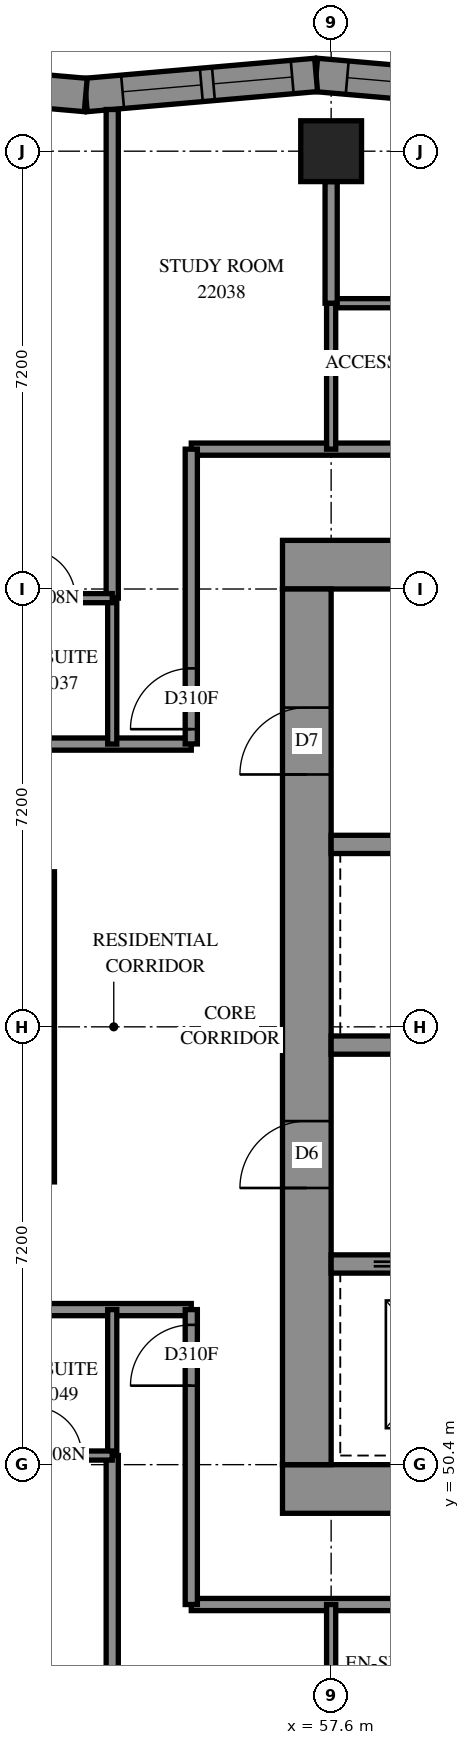
"""IFC4 building model, lengths in metres.
Left out: names, types, materials, properties, quantities, classifications, styles, units other than length and angle.
Written with IfcOpenShell. Run it as: python <this file> out.ifc"""

import sys

from ifc_helpers import new_model, si_unit, direction, frame, frame_2d, origin, origin_2d, place, context, subcontext, project, spatial, polyline, rectangle, outline, extrude, element, fill, save


model = new_model("IFC4")
c1 = context("Model", 3, precision=1e-05, world=origin(), true_north=direction((0.0, 1.0)))
c2 = subcontext(c1, "Body", "Model", "MODEL_VIEW")
j1 = project(units=[si_unit("LENGTHUNIT", "METRE"), si_unit("PLANEANGLEUNIT", "RADIAN")], contexts=[c1])
p1 = place(None, origin())
s1 = spatial("IfcSite", under=j1, at=p1, CompositionType="ELEMENT")
p2 = place(p1, origin())
s2 = spatial("IfcBuilding", under=s1, at=p2, CompositionType="ELEMENT")
p3 = place(p2, frame((0.0, 0.0, 84.6)))
s3 = spatial("IfcBuildingStorey", under=s2, at=p3, CompositionType="ELEMENT", Elevation=84.6)
p4 = place(p3, frame((57.6, 72.0, 0.0), z_axis=(0.0, 0.0, 1.0), x_axis=(1.0, 0.0, 0.0)))
e1 = element("IfcColumn", 1, at=p4, inside=s3, PredefinedType="COLUMN", context=c2, shape_type="SweptSolid", body=[
    extrude(rectangle(XDim=1.0, YDim=1.0, at=origin_2d()), origin(), (0.0, 0.0, 1.0), 3.1),
])
p5 = place(p3, frame((56.8, 50.0, -0.3), z_axis=(0.0, 0.0, 1.0), x_axis=(1.0, 0.0, 0.0)))
e2 = element("IfcWall", 2, at=p5, inside=s3, PredefinedType="SHEAR", context=c2, shape_type="SweptSolid", body=[
    extrude(rectangle(XDim=16.0, YDim=0.8, at=frame_2d((8.0, 0.0))), origin(), (0.0, 0.0, 1.0), 2.7),
])
p6 = place(p3, frame((56.8, 65.2, -0.3), z_axis=(0.0, 0.0, 1.0), x_axis=(1.0, 0.0, 0.0)))
e3 = element("IfcWall", 3, at=p6, inside=s3, PredefinedType="SHEAR", context=c2, shape_type="SweptSolid", body=[
    extrude(rectangle(XDim=16.0, YDim=0.8, at=frame_2d((8.0, 0.0))), origin(), (0.0, 0.0, 1.0), 2.7),
])
p7 = place(p6, frame((10.8, 0.0, 0.3)))
e4 = element("IfcOpeningElement", 4, at=p7, cuts=e3, PredefinedType="OPENING", context=c2, shape_type="SweptSolid", body=[
    extrude(rectangle(XDim=0.8, YDim=2.1, at=frame_2d((0.4, 1.05))), frame((0.0, 0.41, 0.0), z_axis=(0.0, -1.0, 0.0), x_axis=(1.0, 0.0, 0.0)), (0.0, 0.0, 1.0), 0.82),
])
p8 = place(p3, frame((57.2, 50.4, -0.3), z_axis=(0.0, 0.0, 1.0), x_axis=(0.0, 1.0, 0.0)))
e5 = element("IfcWall", 5, at=p8, inside=s3, PredefinedType="SHEAR", context=c2, shape_type="SweptSolid", body=[
    extrude(rectangle(XDim=14.4, YDim=0.8, at=frame_2d((7.2, 0.0))), origin(), (0.0, 0.0, 1.0), 2.7),
])
p9 = place(p8, frame((4.55, 0.0, 0.3)))
e6 = element("IfcOpeningElement", 6, at=p9, cuts=e5, PredefinedType="OPENING", context=c2, shape_type="SweptSolid", body=[
    extrude(rectangle(XDim=1.1, YDim=2.1, at=frame_2d((0.55, 1.05))), frame((0.0, 0.41, 0.0), z_axis=(0.0, -1.0, 0.0), x_axis=(1.0, 0.0, 0.0)), (0.0, 0.0, 1.0), 0.82),
])
p10 = place(p8, frame((11.35, 0.0, 0.3)))
e7 = element("IfcOpeningElement", 7, at=p10, cuts=e5, PredefinedType="OPENING", context=c2, shape_type="SweptSolid", body=[
    extrude(rectangle(XDim=1.1, YDim=2.1, at=frame_2d((0.55, 1.05))), frame((0.0, 0.41, 0.0), z_axis=(0.0, -1.0, 0.0), x_axis=(1.0, 0.0, 0.0)), (0.0, 0.0, 1.0), 0.82),
])
p11 = place(p3, frame((57.6, 53.7, 0.0), z_axis=(0.0, 0.0, 1.0), x_axis=(1.0, 0.0, 0.0)))
e8 = element("IfcWall", 8, at=p11, inside=s3, PredefinedType="SOLIDWALL", context=c2, shape_type="SweptSolid", body=[
    extrude(rectangle(XDim=14.4, YDim=0.3, at=frame_2d((7.2, 0.0))), origin(), (0.0, 0.0, 1.0), 3.1),
])
p12 = place(p11, frame((1.25, 0.0, 0.0)))
e9 = element("IfcOpeningElement", 9, at=p12, cuts=e8, PredefinedType="OPENING", context=c2, shape_type="SweptSolid", body=[
    extrude(rectangle(XDim=1.1, YDim=2.1, at=frame_2d((0.55, 1.05))), frame((0.0, 0.16, 0.0), z_axis=(0.0, -1.0, 0.0), x_axis=(1.0, 0.0, 0.0)), (0.0, 0.0, 1.0), 0.32),
])
p13 = place(p11, frame((4.85, 0.0, 0.0)))
e10 = element("IfcOpeningElement", 10, at=p13, cuts=e8, PredefinedType="OPENING", context=c2, shape_type="SweptSolid", body=[
    extrude(rectangle(XDim=1.1, YDim=2.1, at=frame_2d((0.55, 1.05))), frame((0.0, 0.16, 0.0), z_axis=(0.0, -1.0, 0.0), x_axis=(1.0, 0.0, 0.0)), (0.0, 0.0, 1.0), 0.32),
])
p14 = place(p11, frame((8.45, 0.0, 0.0)))
e11 = element("IfcOpeningElement", 11, at=p14, cuts=e8, PredefinedType="OPENING", context=c2, shape_type="SweptSolid", body=[
    extrude(rectangle(XDim=1.1, YDim=2.1, at=frame_2d((0.55, 1.05))), frame((0.0, 0.16, 0.0), z_axis=(0.0, -1.0, 0.0), x_axis=(1.0, 0.0, 0.0)), (0.0, 0.0, 1.0), 0.32),
])
p15 = place(p11, frame((12.05, 0.0, 0.0)))
e12 = element("IfcOpeningElement", 12, at=p15, cuts=e8, PredefinedType="OPENING", context=c2, shape_type="SweptSolid", body=[
    extrude(rectangle(XDim=1.1, YDim=2.1, at=frame_2d((0.55, 1.05))), frame((0.0, 0.16, 0.0), z_axis=(0.0, -1.0, 0.0), x_axis=(1.0, 0.0, 0.0)), (0.0, 0.0, 1.0), 0.32),
])
p16 = place(p3, frame((57.6, 57.3, 0.0), z_axis=(0.0, 0.0, 1.0), x_axis=(1.0, 0.0, 0.0)))
e13 = element("IfcWall", 13, at=p16, inside=s3, PredefinedType="SOLIDWALL", context=c2, shape_type="SweptSolid", body=[
    extrude(rectangle(XDim=14.4, YDim=0.3, at=frame_2d((7.2, 0.0))), origin(), (0.0, 0.0, 1.0), 3.1),
])
p17 = place(p16, frame((12.05, 0.0, 0.0)))
e14 = element("IfcOpeningElement", 14, at=p17, cuts=e13, PredefinedType="OPENING", context=c2, shape_type="SweptSolid", body=[
    extrude(rectangle(XDim=1.1, YDim=2.1, at=frame_2d((0.55, 1.05))), frame((0.0, 0.16, 0.0), z_axis=(0.0, -1.0, 0.0), x_axis=(1.0, 0.0, 0.0)), (0.0, 0.0, 1.0), 0.32),
])
p18 = place(p3, frame((57.6, 60.6, 0.0), z_axis=(0.0, 0.0, 1.0), x_axis=(1.0, 0.0, 0.0)))
e15 = element("IfcWall", 15, at=p18, inside=s3, PredefinedType="SOLIDWALL", context=c2, shape_type="SweptSolid", body=[
    extrude(rectangle(XDim=7.2, YDim=0.3, at=frame_2d((3.6, 0.0))), origin(), (0.0, 0.0, 1.0), 3.1),
])
p19 = place(p3, frame((61.141, 72.924, 0.0), z_axis=(0.0, 0.0, 1.0), x_axis=(-0.9962273538, 0.0867816769, 0.0)))
e16 = element("IfcWall", 16, at=p19, inside=s3, PredefinedType="SOLIDWALL", context=c2, shape_type="SweptSolid", body=[
    extrude(outline(polyline([(0.024, -0.275), (3.827, -0.275), (3.779, 0.275), (-0.024, 0.275), (0.024, -0.275)])), origin(), (0.0, 0.0, 1.0), 3.1),
])
p20 = place(p19, frame((0.489, 0.0, 0.5)))
e17 = element("IfcOpeningElement", 17, at=p20, cuts=e16, PredefinedType="OPENING", context=c2, shape_type="SweptSolid", body=[
    extrude(rectangle(XDim=1.3, YDim=2.45, at=frame_2d((0.65, 1.225))), frame((0.0, 0.285, 0.0), z_axis=(0.0, -1.0, 0.0), x_axis=(1.0, 0.0, 0.0)), (0.0, 0.0, 1.0), 0.57),
])
p21 = place(p19, frame((1.989, 0.0, 0.5)))
e18 = element("IfcOpeningElement", 18, at=p21, cuts=e16, PredefinedType="OPENING", context=c2, shape_type="SweptSolid", body=[
    extrude(rectangle(XDim=1.3, YDim=2.45, at=frame_2d((0.65, 1.225))), frame((0.0, 0.285, 0.0), z_axis=(0.0, -1.0, 0.0), x_axis=(1.0, 0.0, 0.0)), (0.0, 0.0, 1.0), 0.57),
])
p22 = place(p3, frame((57.353, 73.254, 0.0), z_axis=(0.0, 0.0, 1.0), x_axis=(-0.9962273538, -0.0867816769, 0.0)))
e19 = element("IfcWall", 19, at=p22, inside=s3, PredefinedType="SOLIDWALL", context=c2, shape_type="SweptSolid", body=[
    extrude(outline(polyline([(-0.024, -0.275), (3.779, -0.275), (3.827, 0.275), (0.024, 0.275), (-0.024, -0.275)])), origin(), (0.0, 0.0, 1.0), 3.1),
])
p23 = place(p22, frame((0.395, 0.0, 0.5)))
e20 = element("IfcOpeningElement", 20, at=p23, cuts=e19, PredefinedType="OPENING", context=c2, shape_type="SweptSolid", body=[
    extrude(rectangle(XDim=1.3, YDim=2.45, at=frame_2d((0.65, 1.225))), frame((0.0, 0.285, 0.0), z_axis=(0.0, -1.0, 0.0), x_axis=(1.0, 0.0, 0.0)), (0.0, 0.0, 1.0), 0.57),
])
p24 = place(p22, frame((1.895, 0.0, 0.5)))
e21 = element("IfcOpeningElement", 21, at=p24, cuts=e19, PredefinedType="OPENING", context=c2, shape_type="SweptSolid", body=[
    extrude(rectangle(XDim=1.3, YDim=2.45, at=frame_2d((0.65, 1.225))), frame((0.0, 0.285, 0.0), z_axis=(0.0, -1.0, 0.0), x_axis=(1.0, 0.0, 0.0)), (0.0, 0.0, 1.0), 0.57),
])
p25 = place(p3, frame((53.564, 72.924, 0.0), z_axis=(0.0, 0.0, 1.0), x_axis=(-0.9962271558, 0.0867839505, 0.0)))
e22 = element("IfcWall", 22, at=p25, inside=s3, PredefinedType="SOLIDWALL", context=c2, shape_type="SweptSolid", body=[
    extrude(outline(polyline([(0.024, -0.275), (3.827, -0.275), (3.779, 0.275), (-0.024, 0.275), (0.024, -0.275)])), origin(), (0.0, 0.0, 1.0), 3.1),
])
p26 = place(p25, frame((1.088, 0.0, 0.5)))
e23 = element("IfcOpeningElement", 23, at=p26, cuts=e22, PredefinedType="OPENING", context=c2, shape_type="SweptSolid", body=[
    extrude(rectangle(XDim=1.2, YDim=2.45, at=frame_2d((0.6, 1.225))), frame((0.0, 0.285, 0.0), z_axis=(0.0, -1.0, 0.0), x_axis=(1.0, 0.0, 0.0)), (0.0, 0.0, 1.0), 0.57),
])
p27 = place(p3, frame((33.45, 62.25, 0.0), z_axis=(0.0, 0.0, 1.0), x_axis=(1.0, 0.0, 0.0)))
e24 = element("IfcWall", 24, at=p27, inside=s3, PredefinedType="PARTITIONING", context=c2, shape_type="SweptSolid", body=[
    extrude(rectangle(XDim=21.85, YDim=0.2, at=frame_2d((10.925, 0.0))), origin(), (0.0, 0.0, 1.0), 3.1),
])
p28 = place(p27, frame((0.144, 0.0, 0.0)))
e25 = element("IfcOpeningElement", 25, at=p28, cuts=e24, PredefinedType="OPENING", context=c2, shape_type="SweptSolid", body=[
    extrude(rectangle(XDim=1.0, YDim=2.1, at=frame_2d((0.5, 1.05))), frame((0.0, 0.11, 0.0), z_axis=(0.0, -1.0, 0.0), x_axis=(1.0, 0.0, 0.0)), (0.0, 0.0, 1.0), 0.22),
])
p29 = place(p27, frame((2.95, 0.0, 0.0)))
e26 = element("IfcOpeningElement", 26, at=p29, cuts=e24, PredefinedType="OPENING", context=c2, shape_type="SweptSolid", body=[
    extrude(rectangle(XDim=0.9, YDim=2.1, at=frame_2d((0.45, 1.05))), frame((0.0, 0.11, 0.0), z_axis=(0.0, -1.0, 0.0), x_axis=(1.0, 0.0, 0.0)), (0.0, 0.0, 1.0), 0.22),
])
p30 = place(p27, frame((8.407, 0.0, 0.0)))
e27 = element("IfcOpeningElement", 27, at=p30, cuts=e24, PredefinedType="OPENING", context=c2, shape_type="SweptSolid", body=[
    extrude(rectangle(XDim=0.9, YDim=2.1, at=frame_2d((0.45, 1.05))), frame((0.0, 0.11, 0.0), z_axis=(0.0, -1.0, 0.0), x_axis=(1.0, 0.0, 0.0)), (0.0, 0.0, 1.0), 0.22),
])
p31 = place(p27, frame((15.7, 0.0, 0.0)))
e28 = element("IfcOpeningElement", 28, at=p31, cuts=e24, PredefinedType="OPENING", context=c2, shape_type="SweptSolid", body=[
    extrude(rectangle(XDim=0.9, YDim=2.1, at=frame_2d((0.45, 1.05))), frame((0.0, 0.11, 0.0), z_axis=(0.0, -1.0, 0.0), x_axis=(1.0, 0.0, 0.0)), (0.0, 0.0, 1.0), 0.22),
])
p32 = place(p27, frame((17.35, 0.0, 0.0)))
e29 = element("IfcOpeningElement", 29, at=p32, cuts=e24, PredefinedType="OPENING", context=c2, shape_type="SweptSolid", body=[
    extrude(rectangle(XDim=0.9, YDim=2.1, at=frame_2d((0.45, 1.05))), frame((0.0, 0.11, 0.0), z_axis=(0.0, -1.0, 0.0), x_axis=(1.0, 0.0, 0.0)), (0.0, 0.0, 1.0), 0.22),
])
p33 = place(p3, frame((55.3, 48.1, 0.0), z_axis=(0.0, 0.0, 1.0), x_axis=(1.0, 0.0, 0.0)))
e30 = element("IfcWall", 30, at=p33, inside=s3, PredefinedType="PARTITIONING", context=c2, shape_type="SweptSolid", body=[
    extrude(rectangle(XDim=19.092, YDim=0.2, at=frame_2d((9.546, 0.0))), origin(), (0.0, 0.0, 1.0), 3.1),
])
p34 = place(p33, frame((6.199, 0.0, 0.0)))
e31 = element("IfcOpeningElement", 31, at=p34, cuts=e30, PredefinedType="OPENING", context=c2, shape_type="SweptSolid", body=[
    extrude(rectangle(XDim=0.9, YDim=2.1, at=frame_2d((0.45, 1.05))), frame((0.0, 0.11, 0.0), z_axis=(0.0, -1.0, 0.0), x_axis=(1.0, 0.0, 0.0)), (0.0, 0.0, 1.0), 0.22),
])
p35 = place(p33, frame((13.363, 0.0, 0.0)))
e32 = element("IfcOpeningElement", 32, at=p35, cuts=e30, PredefinedType="OPENING", context=c2, shape_type="SweptSolid", body=[
    extrude(rectangle(XDim=1.0, YDim=2.1, at=frame_2d((0.5, 1.05))), frame((0.0, 0.11, 0.0), z_axis=(0.0, -1.0, 0.0), x_axis=(1.0, 0.0, 0.0)), (0.0, 0.0, 1.0), 0.22),
])
p36 = place(p3, frame((55.3, 67.1, 0.0), z_axis=(0.0, 0.0, 1.0), x_axis=(1.0, 0.0, 0.0)))
e33 = element("IfcWall", 33, at=p36, inside=s3, PredefinedType="PARTITIONING", context=c2, shape_type="SweptSolid", body=[
    extrude(rectangle(XDim=19.0, YDim=0.2, at=frame_2d((9.5, 0.0))), origin(), (0.0, 0.0, 1.0), 3.1),
])
p37 = place(p36, frame((6.161, 0.0, 0.0)))
e34 = element("IfcOpeningElement", 34, at=p37, cuts=e33, PredefinedType="OPENING", context=c2, shape_type="SweptSolid", body=[
    extrude(rectangle(XDim=0.9, YDim=2.1, at=frame_2d((0.45, 1.05))), frame((0.0, 0.11, 0.0), z_axis=(0.0, -1.0, 0.0), x_axis=(1.0, 0.0, 0.0)), (0.0, 0.0, 1.0), 0.22),
])
p38 = place(p36, frame((13.386, 0.0, 0.0)))
e35 = element("IfcOpeningElement", 35, at=p38, cuts=e33, PredefinedType="OPENING", context=c2, shape_type="SweptSolid", body=[
    extrude(rectangle(XDim=1.0, YDim=2.1, at=frame_2d((0.5, 1.05))), frame((0.0, 0.11, 0.0), z_axis=(0.0, -1.0, 0.0), x_axis=(1.0, 0.0, 0.0)), (0.0, 0.0, 1.0), 0.22),
])
p39 = place(p3, frame((54.0, 42.42, 0.0), z_axis=(0.0, 0.0, 1.0), x_axis=(0.0, 1.0, 0.0)))
e36 = element("IfcWall", 36, at=p39, inside=s3, PredefinedType="PARTITIONING", context=c2, shape_type="SweptSolid", body=[
    extrude(rectangle(XDim=8.13, YDim=0.2, at=frame_2d((4.065, 0.0))), origin(), (0.0, 0.0, 1.0), 3.1),
])
p40 = place(p3, frame((54.0, 64.65, 0.0), z_axis=(0.0, 0.0, 1.0), x_axis=(0.0, 1.0, 0.0)))
e37 = element("IfcWall", 37, at=p40, inside=s3, PredefinedType="PARTITIONING", context=c2, shape_type="SweptSolid", body=[
    extrude(rectangle(XDim=8.036, YDim=0.2, at=frame_2d((4.018, 0.0))), origin(), (0.0, 0.0, 1.0), 3.1),
])
p41 = place(p3, frame((52.95, 55.05, 0.0), z_axis=(0.0, 0.0, 1.0), x_axis=(0.0, 1.0, 0.0)))
e38 = element("IfcWall", 38, at=p41, inside=s3, PredefinedType="PARTITIONING", context=c2, shape_type="SweptSolid", body=[
    extrude(rectangle(XDim=5.1, YDim=0.2, at=frame_2d((2.55, 0.0))), origin(), (0.0, 0.0, 1.0), 3.1),
])
p42 = place(p3, frame((50.4, 52.95, 0.0), z_axis=(0.0, 0.0, 1.0), x_axis=(1.0, 0.0, 0.0)))
e39 = element("IfcWall", 39, at=p42, inside=s3, PredefinedType="PARTITIONING", context=c2, shape_type="SweptSolid", body=[
    extrude(rectangle(XDim=4.9, YDim=0.2, at=frame_2d((2.45, 0.0))), origin(), (0.0, 0.0, 1.0), 3.1),
])
p43 = place(p42, frame((0.4, 0.0, 0.0)))
e40 = element("IfcOpeningElement", 40, at=p43, cuts=e39, PredefinedType="OPENING", context=c2, shape_type="SweptSolid", body=[
    extrude(rectangle(XDim=0.9, YDim=2.1, at=frame_2d((0.45, 1.05))), frame((0.0, 0.11, 0.0), z_axis=(0.0, -1.0, 0.0), x_axis=(1.0, 0.0, 0.0)), (0.0, 0.0, 1.0), 0.22),
])
p44 = place(p3, frame((55.3, 48.1, 0.0), z_axis=(0.0, 0.0, 1.0), x_axis=(0.0, 1.0, 0.0)))
e41 = element("IfcWall", 41, at=p44, inside=s3, PredefinedType="PARTITIONING", context=c2, shape_type="SweptSolid", body=[
    extrude(rectangle(XDim=4.85, YDim=0.2, at=frame_2d((2.425, 0.0))), origin(), (0.0, 0.0, 1.0), 3.1),
])
p45 = place(p44, frame((3.599, 0.0, 0.0)))
e42 = element("IfcOpeningElement", 42, at=p45, cuts=e41, PredefinedType="OPENING", context=c2, shape_type="SweptSolid", body=[
    extrude(rectangle(XDim=1.0, YDim=2.1, at=frame_2d((0.5, 1.05))), frame((0.0, 0.11, 0.0), z_axis=(0.0, -1.0, 0.0), x_axis=(1.0, 0.0, 0.0)), (0.0, 0.0, 1.0), 0.22),
])
p46 = place(p3, frame((55.3, 62.252, 0.0), z_axis=(0.0, 0.0, 1.0), x_axis=(0.0, 1.0, 0.0)))
e43 = element("IfcWall", 43, at=p46, inside=s3, PredefinedType="PARTITIONING", context=c2, shape_type="SweptSolid", body=[
    extrude(rectangle(XDim=4.848, YDim=0.2, at=frame_2d((2.424, 0.0))), origin(), (0.0, 0.0, 1.0), 3.1),
])
p47 = place(p46, frame((0.243, 0.0, 0.0)))
e44 = element("IfcOpeningElement", 44, at=p47, cuts=e43, PredefinedType="OPENING", context=c2, shape_type="SweptSolid", body=[
    extrude(rectangle(XDim=1.0, YDim=2.1, at=frame_2d((0.5, 1.05))), frame((0.0, 0.11, 0.0), z_axis=(0.0, -1.0, 0.0), x_axis=(1.0, 0.0, 0.0)), (0.0, 0.0, 1.0), 0.22),
])
p48 = place(p3, frame((57.6, 69.5, 0.0), z_axis=(0.0, 0.0, 1.0), x_axis=(1.0, 0.0, 0.0)))
e45 = element("IfcWall", 45, at=p48, inside=s3, PredefinedType="PARTITIONING", context=c2, shape_type="SweptSolid", body=[
    extrude(rectangle(XDim=3.2, YDim=0.15, at=frame_2d((1.6, 0.0))), origin(), (0.0, 0.0, 1.0), 3.1),
])
p49 = place(p48, frame((1.196, 0.0, 0.0)))
e46 = element("IfcOpeningElement", 46, at=p49, cuts=e45, PredefinedType="OPENING", context=c2, shape_type="SweptSolid", body=[
    extrude(rectangle(XDim=0.8, YDim=2.1, at=frame_2d((0.4, 1.05))), frame((0.0, 0.085, 0.0), z_axis=(0.0, -1.0, 0.0), x_axis=(1.0, 0.0, 0.0)), (0.0, 0.0, 1.0), 0.17),
])
for number, where, z_axis, x_axis in (
    (47, (54.0, 50.55, 0.0), (0.0, 0.0, 1.0), (0.0, 1.0, 0.0)),
    (48, (54.0, 62.25, 0.0), (0.0, 0.0, 1.0), (0.0, 1.0, 0.0)),
    (49, (57.6, 67.1, 0.0), (0.0, 0.0, 1.0), (0.0, 1.0, 0.0)),
    (50, (57.6, 45.7, 0.0), (0.0, 0.0, 1.0), (0.0, 1.0, 0.0)),
):
    element("IfcWall", number, at=place(p3, frame(where, z_axis=z_axis, x_axis=x_axis)), inside=s3, PredefinedType="PARTITIONING", context=c2, shape_type="SweptSolid", body=[
        extrude(rectangle(XDim=2.4, YDim=0.15, at=frame_2d((1.2, 0.0))), origin(), (0.0, 0.0, 1.0), 3.1),
    ])
p50 = place(p3, frame((57.6, 69.5, 0.0), z_axis=(0.0, 0.0, 1.0), x_axis=(0.0, 1.0, 0.0)))
e51 = element("IfcWall", 51, at=p50, inside=s3, PredefinedType="PARTITIONING", context=c2, shape_type="SweptSolid", body=[
    extrude(rectangle(XDim=2.0, YDim=0.2, at=frame_2d((1.0, 0.0))), origin(), (0.0, 0.0, 1.0), 3.1),
])
p51 = place(p3, frame((52.1, 64.65, 0.0), z_axis=(0.0, 0.0, 1.0), x_axis=(1.0, 0.0, 0.0)))
e52 = element("IfcWall", 52, at=p51, inside=s3, PredefinedType="PARTITIONING", context=c2, shape_type="SweptSolid", body=[
    extrude(rectangle(XDim=1.9, YDim=0.15, at=frame_2d((0.95, 0.0))), origin(), (0.0, 0.0, 1.0), 3.1),
])
p52 = place(p51, frame((0.493, 0.0, 0.0)))
e53 = element("IfcOpeningElement", 53, at=p52, cuts=e52, PredefinedType="OPENING", context=c2, shape_type="SweptSolid", body=[
    extrude(rectangle(XDim=0.8, YDim=2.1, at=frame_2d((0.4, 1.05))), frame((0.0, 0.085, 0.0), z_axis=(0.0, -1.0, 0.0), x_axis=(1.0, 0.0, 0.0)), (0.0, 0.0, 1.0), 0.17),
])
p53 = place(p3, frame((52.1, 50.55, 0.0), z_axis=(0.0, 0.0, 1.0), x_axis=(1.0, 0.0, 0.0)))
e54 = element("IfcWall", 54, at=p53, inside=s3, PredefinedType="PARTITIONING", context=c2, shape_type="SweptSolid", body=[
    extrude(rectangle(XDim=1.9, YDim=0.15, at=frame_2d((0.95, 0.0))), origin(), (0.0, 0.0, 1.0), 3.1),
])
p54 = place(p53, frame((0.598, 0.0, 0.0)))
e55 = element("IfcOpeningElement", 55, at=p54, cuts=e54, PredefinedType="OPENING", context=c2, shape_type="SweptSolid", body=[
    extrude(rectangle(XDim=0.8, YDim=2.1, at=frame_2d((0.4, 1.05))), frame((0.0, 0.085, 0.0), z_axis=(0.0, -1.0, 0.0), x_axis=(1.0, 0.0, 0.0)), (0.0, 0.0, 1.0), 0.17),
])
p55 = place(p21, origin())
e56 = element("IfcWindow", 56, at=p55, inside=s3, PartitioningType="SINGLE_PANEL", PredefinedType="WINDOW", context=c2, shape_type="SweptSolid", body=[
    extrude(rectangle(XDim=1.3, YDim=2.45, at=frame_2d((0.65, 1.225))), frame((0.0, 0.155, 0.0), z_axis=(0.0, -1.0, 0.0), x_axis=(1.0, 0.0, 0.0)), (0.0, 0.0, 1.0), 0.06),
])
fill(e18, e56)
p56 = place(p23, origin())
e57 = element("IfcWindow", 57, at=p56, inside=s3, PartitioningType="SINGLE_PANEL", PredefinedType="WINDOW", context=c2, shape_type="SweptSolid", body=[
    extrude(rectangle(XDim=1.3, YDim=2.45, at=frame_2d((0.65, 1.225))), frame((0.0, 0.155, 0.0), z_axis=(0.0, -1.0, 0.0), x_axis=(1.0, 0.0, 0.0)), (0.0, 0.0, 1.0), 0.06),
])
fill(e20, e57)
p57 = place(p24, origin())
e58 = element("IfcWindow", 58, at=p57, inside=s3, PartitioningType="SINGLE_PANEL", PredefinedType="WINDOW", context=c2, shape_type="SweptSolid", body=[
    extrude(rectangle(XDim=1.3, YDim=2.45, at=frame_2d((0.65, 1.225))), frame((0.0, 0.155, 0.0), z_axis=(0.0, -1.0, 0.0), x_axis=(1.0, 0.0, 0.0)), (0.0, 0.0, 1.0), 0.06),
])
fill(e21, e58)
p58 = place(p9, origin())
e59 = element("IfcDoor", 59, at=p58, inside=s3, OperationType="DOUBLE_DOOR_SINGLE_SWING", PredefinedType="DOOR", context=c2, shape_type="SweptSolid", body=[
    extrude(rectangle(XDim=1.1, YDim=2.1, at=frame_2d((0.55, 1.05))), frame((0.0, 0.025, 0.0), z_axis=(0.0, -1.0, 0.0), x_axis=(1.0, 0.0, 0.0)), (0.0, 0.0, 1.0), 0.05),
])
fill(e6, e59)
p59 = place(p10, origin())
e60 = element("IfcDoor", 60, at=p59, inside=s3, OperationType="SINGLE_SWING_LEFT", PredefinedType="DOOR", context=c2, shape_type="SweptSolid", body=[
    extrude(rectangle(XDim=1.1, YDim=2.1, at=frame_2d((0.55, 1.05))), frame((0.0, 0.025, 0.0), z_axis=(0.0, -1.0, 0.0), x_axis=(1.0, 0.0, 0.0)), (0.0, 0.0, 1.0), 0.05),
])
fill(e7, e60)
p60 = place(p52, origin())
e61 = element("IfcDoor", 61, at=p60, inside=s3, OperationType="SINGLE_SWING_RIGHT", PredefinedType="DOOR", context=c2, shape_type="SweptSolid", body=[
    extrude(rectangle(XDim=0.8, YDim=2.1, at=frame_2d((0.4, 1.05))), frame((0.0, 0.025, 0.0), z_axis=(0.0, -1.0, 0.0), x_axis=(1.0, 0.0, 0.0)), (0.0, 0.0, 1.0), 0.05),
])
fill(e53, e61)
p61 = place(p47, origin())
e62 = element("IfcDoor", 62, at=p61, inside=s3, OperationType="SINGLE_SWING_LEFT", PredefinedType="DOOR", context=c2, shape_type="SweptSolid", body=[
    extrude(rectangle(XDim=1.0, YDim=2.1, at=frame_2d((0.5, 1.05))), frame((0.0, 0.025, 0.0), z_axis=(0.0, -1.0, 0.0), x_axis=(1.0, 0.0, 0.0)), (0.0, 0.0, 1.0), 0.05),
])
fill(e44, e62)
p62 = place(p54, origin())
e63 = element("IfcDoor", 63, at=p62, inside=s3, OperationType="SINGLE_SWING_RIGHT", PredefinedType="DOOR", context=c2, shape_type="SweptSolid", body=[
    extrude(rectangle(XDim=0.8, YDim=2.1, at=frame_2d((0.4, 1.05))), frame((0.0, 0.025, 0.0), z_axis=(0.0, -1.0, 0.0), x_axis=(1.0, 0.0, 0.0)), (0.0, 0.0, 1.0), 0.05),
])
fill(e55, e63)
p63 = place(p45, origin())
e64 = element("IfcDoor", 64, at=p63, inside=s3, OperationType="SINGLE_SWING_RIGHT", PredefinedType="DOOR", context=c2, shape_type="SweptSolid", body=[
    extrude(rectangle(XDim=1.0, YDim=2.1, at=frame_2d((0.5, 1.05))), frame((0.0, 0.025, 0.0), z_axis=(0.0, -1.0, 0.0), x_axis=(1.0, 0.0, 0.0)), (0.0, 0.0, 1.0), 0.05),
])
fill(e42, e64)
save(model, sys.argv[1])
